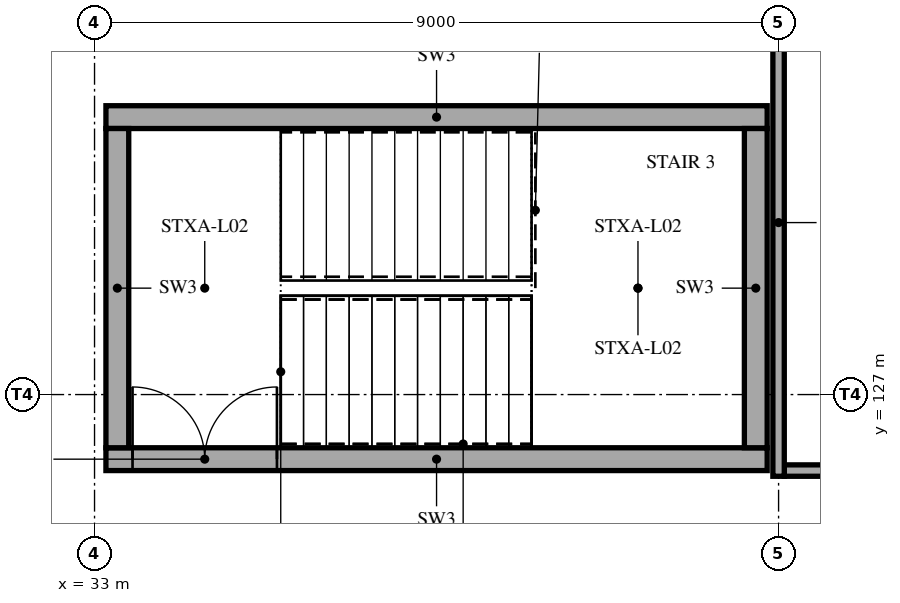
"""IFC4 building model, lengths in metres.
Left out: names, types, materials, properties, quantities, classifications, styles, units other than length and angle.
Written with IfcOpenShell. Run it as: python <this file> out.ifc"""

import sys

from ifc_helpers import new_model, si_unit, direction, frame, frame_2d, origin, place, context, subcontext, project, spatial, rectangle, extrude, element, fill, save


model = new_model("IFC4")
c1 = context("Model", 3, precision=1e-05, world=origin(), true_north=direction((0.0, 1.0)))
c2 = subcontext(c1, "Body", "Model", "MODEL_VIEW")
j1 = project(units=[si_unit("LENGTHUNIT", "METRE"), si_unit("PLANEANGLEUNIT", "RADIAN")], contexts=[c1])
p1 = place(None, origin())
s1 = spatial("IfcSite", under=j1, at=p1, CompositionType="ELEMENT")
p2 = place(p1, origin())
s2 = spatial("IfcBuilding", under=s1, at=p2, CompositionType="ELEMENT")
p3 = place(p2, frame((0.0, 0.0, 10.0)))
s3 = spatial("IfcBuildingStorey", under=s2, at=p3, CompositionType="ELEMENT", Elevation=10.0)
p4 = place(p3, frame((33.15, 126.15, 0.0), z_axis=(0.0, 0.0, 1.0), x_axis=(1.0, 0.0, 0.0)))
e1 = element("IfcWall", 1, at=p4, inside=s3, PredefinedType="SHEAR", context=c2, shape_type="SweptSolid", body=[
    extrude(rectangle(XDim=8.7, YDim=0.3, at=frame_2d((4.35, 0.0))), origin(), (0.0, 0.0, 1.0), 5.0),
])
p5 = place(p4, frame((0.35, 0.0, 0.0)))
e2 = element("IfcOpeningElement", 2, at=p5, cuts=e1, PredefinedType="OPENING", context=c2, shape_type="SweptSolid", body=[
    extrude(rectangle(XDim=1.9, YDim=2.1, at=frame_2d((0.95, 1.05))), frame((0.0, 0.16, 0.0), z_axis=(0.0, -1.0, 0.0), x_axis=(1.0, 0.0, 0.0)), (0.0, 0.0, 1.0), 0.32),
])
p6 = place(p3, frame((33.15, 130.65, 0.0), z_axis=(0.0, 0.0, 1.0), x_axis=(1.0, 0.0, 0.0)))
e3 = element("IfcWall", 3, at=p6, inside=s3, PredefinedType="SHEAR", context=c2, shape_type="SweptSolid", body=[
    extrude(rectangle(XDim=8.7, YDim=0.3, at=frame_2d((4.35, 0.0))), origin(), (0.0, 0.0, 1.0), 5.0),
])
for number, where, z_axis, x_axis in (
    (4, (33.3, 126.3, 0.0), (0.0, 0.0, 1.0), (0.0, 1.0, 0.0)),
    (5, (41.7, 126.3, 0.0), (0.0, 0.0, 1.0), (0.0, 1.0, 0.0)),
):
    element("IfcWall", number, at=place(p3, frame(where, z_axis=z_axis, x_axis=x_axis)), inside=s3, PredefinedType="SHEAR", context=c2, shape_type="SweptSolid", body=[
        extrude(rectangle(XDim=4.2, YDim=0.3, at=frame_2d((2.1, 0.0))), origin(), (0.0, 0.0, 1.0), 5.0),
    ])
p7 = place(p3, frame((42.075, 126.0, 0.0), z_axis=(0.0, 0.0, 1.0), x_axis=(1.0, 0.0, 0.0)))
e6 = element("IfcWall", 6, at=p7, inside=s3, PredefinedType="PARTITIONING", context=c2, shape_type="SweptSolid", body=[
    extrude(rectangle(XDim=8.85, YDim=0.15, at=frame_2d((4.425, 0.0))), origin(), (0.0, 0.0, 1.0), 4.8),
])
p8 = place(p7, frame((0.6, 0.0, 0.0)))
e7 = element("IfcOpeningElement", 7, at=p8, cuts=e6, PredefinedType="OPENING", context=c2, shape_type="SweptSolid", body=[
    extrude(rectangle(XDim=1.0, YDim=2.1, at=frame_2d((0.5, 1.05))), frame((0.0, 0.085, 0.0), z_axis=(0.0, -1.0, 0.0), x_axis=(1.0, 0.0, 0.0)), (0.0, 0.0, 1.0), 0.17),
])
p9 = place(p7, frame((2.2, 0.0, 0.9)))
e8 = element("IfcOpeningElement", 8, at=p9, cuts=e6, PredefinedType="OPENING", context=c2, shape_type="SweptSolid", body=[
    extrude(rectangle(XDim=2.4, YDim=1.5, at=frame_2d((1.2, 0.75))), frame((0.0, 0.085, 0.0), z_axis=(0.0, -1.0, 0.0), x_axis=(1.0, 0.0, 0.0)), (0.0, 0.0, 1.0), 0.17),
])
p10 = place(p7, frame((5.2, 0.0, 0.9)))
e9 = element("IfcOpeningElement", 9, at=p10, cuts=e6, PredefinedType="OPENING", context=c2, shape_type="SweptSolid", body=[
    extrude(rectangle(XDim=2.4, YDim=1.5, at=frame_2d((1.2, 0.75))), frame((0.0, 0.085, 0.0), z_axis=(0.0, -1.0, 0.0), x_axis=(1.0, 0.0, 0.0)), (0.0, 0.0, 1.0), 0.17),
])
p11 = place(p3, frame((42.0, 125.925, 0.0), z_axis=(0.0, 0.0, 1.0), x_axis=(0.0, 1.0, 0.0)))
e10 = element("IfcWall", 10, at=p11, inside=s3, PredefinedType="PARTITIONING", context=c2, shape_type="SweptSolid", body=[
    extrude(rectangle(XDim=6.675, YDim=0.15, at=frame_2d((3.337, 0.0))), origin(), (0.0, 0.0, 1.0), 4.0),
])
p12 = place(p5, origin())
e11 = element("IfcDoor", 11, at=p12, inside=s3, OperationType="DOUBLE_DOOR_SINGLE_SWING", PredefinedType="NOTDEFINED", context=c2, shape_type="SweptSolid", body=[
    extrude(rectangle(XDim=1.9, YDim=2.1, at=frame_2d((0.95, 1.05))), frame((0.0, 0.025, 0.0), z_axis=(0.0, -1.0, 0.0), x_axis=(1.0, 0.0, 0.0)), (0.0, 0.0, 1.0), 0.05),
])
fill(e2, e11)
save(model, sys.argv[1])
